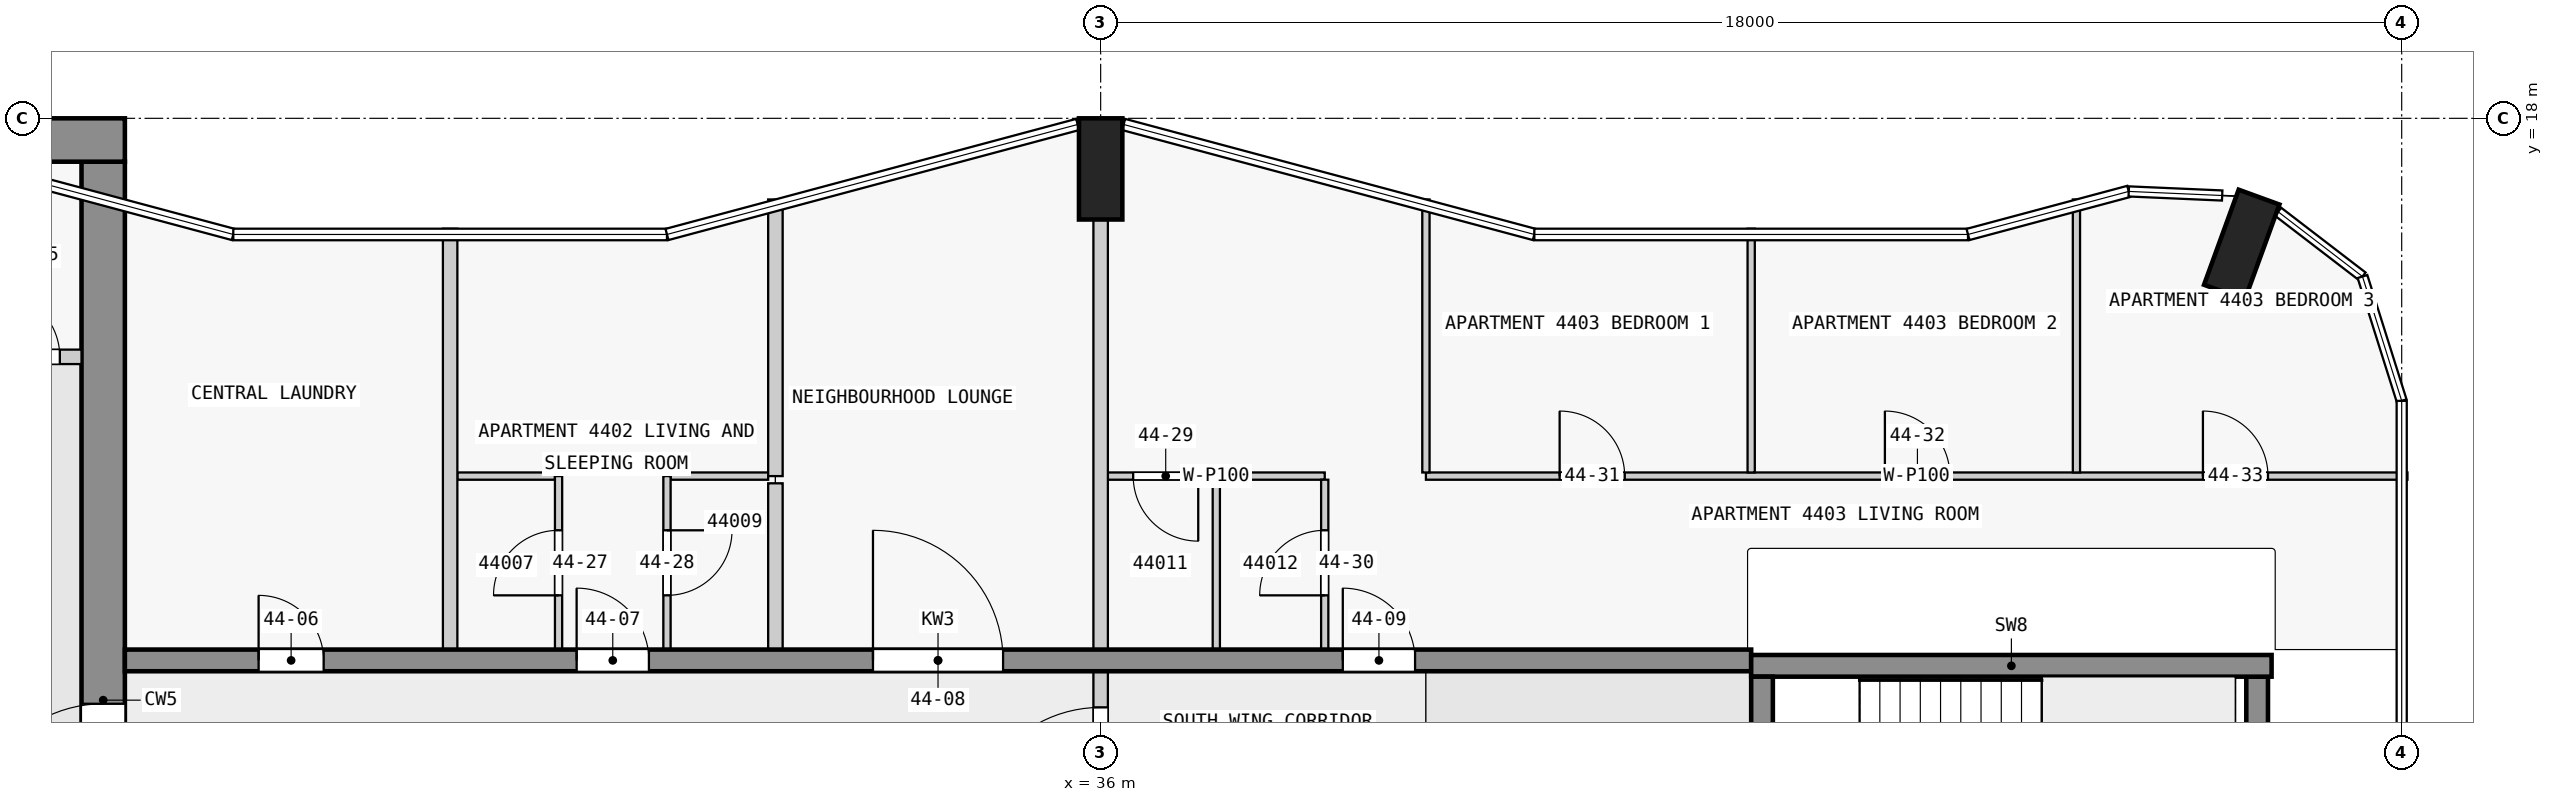
"""IFC4 building model, lengths in metres.
Left out: names, types, materials, properties, quantities, classifications, styles, units other than length and angle.
Written with IfcOpenShell. Run it as: python <this file> out.ifc"""

import sys

from ifc_helpers import new_model, si_unit, direction, frame, frame_2d, origin, origin_2d, place, context, subcontext, project, spatial, rectangle, extrude, element, fill, save


model = new_model("IFC4")
c1 = context("Model", 3, precision=1e-05, world=origin(), true_north=direction((0.0, 1.0)))
c2 = subcontext(c1, "Body", "Model", "MODEL_VIEW")
j1 = project(units=[si_unit("LENGTHUNIT", "METRE"), si_unit("PLANEANGLEUNIT", "RADIAN")], contexts=[c1])
p1 = place(None, origin())
s1 = spatial("IfcSite", under=j1, at=p1, CompositionType="ELEMENT")
p2 = place(p1, origin())
s2 = spatial("IfcBuilding", under=s1, at=p2, CompositionType="ELEMENT")
p3 = place(p2, frame((0.0, 0.0, 170.9)))
s3 = spatial("IfcBuildingStorey", under=s2, at=p3, CompositionType="ELEMENT", Elevation=170.9)
for number, where, z_axis, x_axis in (
    (1, (51.787, 16.252, 0.0), (0.0, 0.0, 1.0), (-0.94, 0.342, 0.0)),
    (2, (36.0, 17.3, 0.0), (0.0, 0.0, 1.0), (1.0, 0.0, 0.0)),
):
    element("IfcColumn", number, at=place(p3, frame(where, z_axis=z_axis, x_axis=x_axis)), inside=s3, PredefinedType="COLUMN", context=c2, shape_type="SweptSolid", body=[
        extrude(rectangle(XDim=0.6, YDim=1.4, at=origin_2d()), origin(), (0.0, 0.0, 1.0), 3.5),
    ])
p4 = place(p3, frame((1.38, 17.7, 0.0), z_axis=(0.0, 0.0, 1.0), x_axis=(1.0, 0.0, 0.0)))
e3 = element("IfcWall", 3, at=p4, inside=s3, PredefinedType="SHEAR", context=c2, shape_type="SweptSolid", body=[
    extrude(rectangle(XDim=21.12, YDim=0.6, at=frame_2d((10.56, 0.0))), origin(), (0.0, 0.0, 1.0), 3.25),
])
p5 = place(p4, frame((6.4, 0.0, 0.0)))
e4 = element("IfcOpeningElement", 4, at=p5, cuts=e3, PredefinedType="OPENING", context=c2, shape_type="SweptSolid", body=[
    extrude(rectangle(XDim=1.8, YDim=2.1, at=frame_2d((0.9, 1.05))), frame((0.0, 0.31, 0.0), z_axis=(0.0, -1.0, 0.0), x_axis=(1.0, 0.0, 0.0)), (0.0, 0.0, 1.0), 0.62),
])
p6 = place(p3, frame((22.2, 2.5, 0.0), z_axis=(0.0, 0.0, 1.0), x_axis=(0.0, 1.0, 0.0)))
e5 = element("IfcWall", 5, at=p6, inside=s3, PredefinedType="SHEAR", context=c2, shape_type="SweptSolid", body=[
    extrude(rectangle(XDim=14.9, YDim=0.6, at=frame_2d((7.45, 0.0))), origin(), (0.0, 0.0, 1.0), 3.25),
])
p7 = place(p6, frame((5.6, 0.0, 0.0)))
e6 = element("IfcOpeningElement", 6, at=p7, cuts=e5, PredefinedType="OPENING", context=c2, shape_type="SweptSolid", body=[
    extrude(rectangle(XDim=1.8, YDim=2.1, at=frame_2d((0.9, 1.05))), frame((0.0, 0.31, 0.0), z_axis=(0.0, -1.0, 0.0), x_axis=(1.0, 0.0, 0.0)), (0.0, 0.0, 1.0), 0.62),
])
p8 = place(p3, frame((45.15, 7.725, 0.0), z_axis=(0.0, 0.0, 1.0), x_axis=(0.0, 1.0, 0.0)))
e7 = element("IfcWall", 7, at=p8, inside=s3, PredefinedType="SHEAR", context=c2, shape_type="SweptSolid", body=[
    extrude(rectangle(XDim=2.55, YDim=0.3, at=frame_2d((1.275, 0.0))), origin(), (0.0, 0.0, 1.0), 3.5),
])
p9 = place(p8, frame((0.725, 0.0, 0.0)))
e8 = element("IfcOpeningElement", 8, at=p9, cuts=e7, PredefinedType="OPENING", context=c2, shape_type="SweptSolid", body=[
    extrude(rectangle(XDim=1.1, YDim=2.1, at=frame_2d((0.55, 1.05))), frame((0.0, 0.16, 0.0), z_axis=(0.0, -1.0, 0.0), x_axis=(1.0, 0.0, 0.0)), (0.0, 0.0, 1.0), 0.32),
])
p10 = place(p3, frame((52.0, 7.725, 0.0), z_axis=(0.0, 0.0, 1.0), x_axis=(0.0, 1.0, 0.0)))
e9 = element("IfcWall", 9, at=p10, inside=s3, PredefinedType="SHEAR", context=c2, shape_type="SweptSolid", body=[
    extrude(rectangle(XDim=2.55, YDim=0.3, at=frame_2d((1.275, 0.0))), origin(), (0.0, 0.0, 1.0), 3.5),
])
p11 = place(p3, frame((45.0, 10.425, 0.0), z_axis=(0.0, 0.0, 1.0), x_axis=(1.0, 0.0, 0.0)))
e10 = element("IfcWall", 10, at=p11, inside=s3, PredefinedType="SHEAR", context=c2, shape_type="SweptSolid", body=[
    extrude(rectangle(XDim=7.2, YDim=0.3, at=frame_2d((3.6, 0.0))), origin(), (0.0, 0.0, 1.0), 3.5),
])
p12 = place(p3, frame((22.5, 10.5, 0.0), z_axis=(0.0, 0.0, 1.0), x_axis=(1.0, 0.0, 0.0)))
e11 = element("IfcWall", 11, at=p12, inside=s3, PredefinedType="SHEAR", context=c2, shape_type="SweptSolid", body=[
    extrude(rectangle(XDim=22.5, YDim=0.3, at=frame_2d((11.25, 0.0))), origin(), (0.0, 0.0, 1.0), 3.25),
])
p13 = place(p12, frame((1.85, 0.0, 0.0)))
e12 = element("IfcOpeningElement", 12, at=p13, cuts=e11, PredefinedType="OPENING", context=c2, shape_type="SweptSolid", body=[
    extrude(rectangle(XDim=0.9, YDim=2.1, at=frame_2d((0.45, 1.05))), frame((0.0, 0.16, 0.0), z_axis=(0.0, -1.0, 0.0), x_axis=(1.0, 0.0, 0.0)), (0.0, 0.0, 1.0), 0.32),
])
p14 = place(p12, frame((6.25, 0.0, 0.0)))
e13 = element("IfcOpeningElement", 13, at=p14, cuts=e11, PredefinedType="OPENING", context=c2, shape_type="SweptSolid", body=[
    extrude(rectangle(XDim=1.0, YDim=2.1, at=frame_2d((0.5, 1.05))), frame((0.0, 0.16, 0.0), z_axis=(0.0, -1.0, 0.0), x_axis=(1.0, 0.0, 0.0)), (0.0, 0.0, 1.0), 0.32),
])
p15 = place(p12, frame((10.35, 0.0, 0.0)))
e14 = element("IfcOpeningElement", 14, at=p15, cuts=e11, PredefinedType="OPENING", context=c2, shape_type="SweptSolid", body=[
    extrude(rectangle(XDim=1.8, YDim=2.1, at=frame_2d((0.9, 1.05))), frame((0.0, 0.16, 0.0), z_axis=(0.0, -1.0, 0.0), x_axis=(1.0, 0.0, 0.0)), (0.0, 0.0, 1.0), 0.32),
])
p16 = place(p12, frame((16.85, 0.0, 0.0)))
e15 = element("IfcOpeningElement", 15, at=p16, cuts=e11, PredefinedType="OPENING", context=c2, shape_type="SweptSolid", body=[
    extrude(rectangle(XDim=1.0, YDim=2.1, at=frame_2d((0.5, 1.05))), frame((0.0, 0.16, 0.0), z_axis=(0.0, -1.0, 0.0), x_axis=(1.0, 0.0, 0.0)), (0.0, 0.0, 1.0), 0.32),
])
p17 = place(p3, frame((18.6, 14.7, 0.0), z_axis=(0.0, 0.0, 1.0), x_axis=(1.0, 0.0, 0.0)))
e16 = element("IfcWall", 16, at=p17, inside=s3, PredefinedType="PARTITIONING", context=c2, shape_type="SweptSolid", body=[
    extrude(rectangle(XDim=3.3, YDim=0.2, at=frame_2d((1.65, 0.0))), origin(), (0.0, 0.0, 1.0), 3.25),
])
p18 = place(p17, frame((0.45, 0.0, 0.0)))
e17 = element("IfcOpeningElement", 17, at=p18, cuts=e16, PredefinedType="OPENING", context=c2, shape_type="SweptSolid", body=[
    extrude(rectangle(XDim=0.9, YDim=2.1, at=frame_2d((0.45, 1.05))), frame((0.0, 0.11, 0.0), z_axis=(0.0, -1.0, 0.0), x_axis=(1.0, 0.0, 0.0)), (0.0, 0.0, 1.0), 0.22),
])
p19 = place(p17, frame((2.1, 0.0, 0.0)))
e18 = element("IfcOpeningElement", 18, at=p19, cuts=e16, PredefinedType="OPENING", context=c2, shape_type="SweptSolid", body=[
    extrude(rectangle(XDim=0.9, YDim=2.1, at=frame_2d((0.45, 1.05))), frame((0.0, 0.11, 0.0), z_axis=(0.0, -1.0, 0.0), x_axis=(1.0, 0.0, 0.0)), (0.0, 0.0, 1.0), 0.22),
])
for number, where, z_axis, x_axis in (
    (19, (28.45, 13.05, 0.0), (0.0, 0.0, 1.0), (-1.0, 0.0, 0.0)),
    (20, (31.4, 13.05, 0.0), (0.0, 0.0, 1.0), (-1.0, 0.0, 0.0)),
):
    element("IfcWall", number, at=place(p3, frame(where, z_axis=z_axis, x_axis=x_axis)), inside=s3, PredefinedType="PARTITIONING", context=c2, shape_type="SweptSolid", body=[
        extrude(rectangle(XDim=1.35, YDim=0.1, at=frame_2d((0.675, 0.0))), origin(), (0.0, 0.0, 1.0), 3.25),
    ])
p20 = place(p3, frame((39.1, 13.05, 0.0), z_axis=(0.0, 0.0, 1.0), x_axis=(-1.0, 0.0, 0.0)))
e21 = element("IfcWall", 21, at=p20, inside=s3, PredefinedType="PARTITIONING", context=c2, shape_type="SweptSolid", body=[
    extrude(rectangle(XDim=3.0, YDim=0.1, at=frame_2d((1.5, 0.0))), origin(), (0.0, 0.0, 1.0), 3.25),
])
p21 = place(p20, frame((1.75, 0.0, 0.0)))
e22 = element("IfcOpeningElement", 22, at=p21, cuts=e21, PredefinedType="OPENING", context=c2, shape_type="SweptSolid", body=[
    extrude(rectangle(XDim=0.9, YDim=2.1, at=frame_2d((0.45, 1.05))), frame((0.0, 0.06, 0.0), z_axis=(0.0, -1.0, 0.0), x_axis=(1.0, 0.0, 0.0)), (0.0, 0.0, 1.0), 0.12),
])
p22 = place(p3, frame((40.5, 13.05, 0.0), z_axis=(0.0, 0.0, 1.0), x_axis=(1.0, 0.0, 0.0)))
e23 = element("IfcWall", 23, at=p22, inside=s3, PredefinedType="PARTITIONING", context=c2, shape_type="SweptSolid", body=[
    extrude(rectangle(XDim=13.58, YDim=0.1, at=frame_2d((6.79, 0.0))), origin(), (0.0, 0.0, 1.0), 3.25),
])
p23 = place(p22, frame((1.85, 0.0, 0.0)))
e24 = element("IfcOpeningElement", 24, at=p23, cuts=e23, PredefinedType="OPENING", context=c2, shape_type="SweptSolid", body=[
    extrude(rectangle(XDim=0.9, YDim=2.1, at=frame_2d((0.45, 1.05))), frame((0.0, 0.06, 0.0), z_axis=(0.0, -1.0, 0.0), x_axis=(1.0, 0.0, 0.0)), (0.0, 0.0, 1.0), 0.12),
])
p24 = place(p22, frame((6.35, 0.0, 0.0)))
e25 = element("IfcOpeningElement", 25, at=p24, cuts=e23, PredefinedType="OPENING", context=c2, shape_type="SweptSolid", body=[
    extrude(rectangle(XDim=0.9, YDim=2.1, at=frame_2d((0.45, 1.05))), frame((0.0, 0.06, 0.0), z_axis=(0.0, -1.0, 0.0), x_axis=(1.0, 0.0, 0.0)), (0.0, 0.0, 1.0), 0.12),
])
p25 = place(p22, frame((10.75, 0.0, 0.0)))
e26 = element("IfcOpeningElement", 26, at=p25, cuts=e23, PredefinedType="OPENING", context=c2, shape_type="SweptSolid", body=[
    extrude(rectangle(XDim=0.9, YDim=2.1, at=frame_2d((0.45, 1.05))), frame((0.0, 0.06, 0.0), z_axis=(0.0, -1.0, 0.0), x_axis=(1.0, 0.0, 0.0)), (0.0, 0.0, 1.0), 0.12),
])
p26 = place(p3, frame((27.0, 10.65, 0.0), z_axis=(0.0, 0.0, 1.0), x_axis=(0.0, 1.0, 0.0)))
e27 = element("IfcWall", 27, at=p26, inside=s3, PredefinedType="PARTITIONING", context=c2, shape_type="SweptSolid", body=[
    extrude(rectangle(XDim=5.823, YDim=0.2, at=frame_2d((2.912, 0.0))), origin(), (0.0, 0.0, 1.0), 3.25),
])
p27 = place(p3, frame((28.5, 10.65, 0.0), z_axis=(0.0, 0.0, 1.0), x_axis=(0.0, 1.0, 0.0)))
e28 = element("IfcWall", 28, at=p27, inside=s3, PredefinedType="PARTITIONING", context=c2, shape_type="SweptSolid", body=[
    extrude(rectangle(XDim=2.4, YDim=0.1, at=frame_2d((1.2, 0.0))), origin(), (0.0, 0.0, 1.0), 3.25),
])
p28 = place(p27, frame((0.75, 0.0, 0.0)))
e29 = element("IfcOpeningElement", 29, at=p28, cuts=e28, PredefinedType="OPENING", context=c2, shape_type="SweptSolid", body=[
    extrude(rectangle(XDim=0.9, YDim=2.1, at=frame_2d((0.45, 1.05))), frame((0.0, 0.06, 0.0), z_axis=(0.0, -1.0, 0.0), x_axis=(1.0, 0.0, 0.0)), (0.0, 0.0, 1.0), 0.12),
])
p29 = place(p3, frame((30.0, 13.05, 0.0), z_axis=(0.0, 0.0, 1.0), x_axis=(0.0, -1.0, 0.0)))
e30 = element("IfcWall", 30, at=p29, inside=s3, PredefinedType="PARTITIONING", context=c2, shape_type="SweptSolid", body=[
    extrude(rectangle(XDim=2.4, YDim=0.1, at=frame_2d((1.2, 0.0))), origin(), (0.0, 0.0, 1.0), 3.25),
])
p30 = place(p29, frame((0.75, 0.0, 0.0)))
e31 = element("IfcOpeningElement", 31, at=p30, cuts=e30, PredefinedType="OPENING", context=c2, shape_type="SweptSolid", body=[
    extrude(rectangle(XDim=0.9, YDim=2.1, at=frame_2d((0.45, 1.05))), frame((0.0, 0.06, 0.0), z_axis=(0.0, -1.0, 0.0), x_axis=(1.0, 0.0, 0.0)), (0.0, 0.0, 1.0), 0.12),
])
p31 = place(p3, frame((31.5, 16.878, 0.0), z_axis=(0.0, 0.0, 1.0), x_axis=(0.0, -1.0, 0.0)))
e32 = element("IfcWall", 32, at=p31, inside=s3, PredefinedType="PARTITIONING", context=c2, shape_type="SweptSolid", body=[
    extrude(rectangle(XDim=3.828, YDim=0.2, at=frame_2d((1.914, 0.0))), origin(), (0.0, 0.0, 1.0), 3.25),
])
p32 = place(p3, frame((31.5, 10.65, 0.0), z_axis=(0.0, 0.0, 1.0), x_axis=(0.0, 1.0, 0.0)))
e33 = element("IfcWall", 33, at=p32, inside=s3, PredefinedType="PARTITIONING", context=c2, shape_type="SweptSolid", body=[
    extrude(rectangle(XDim=2.3, YDim=0.2, at=frame_2d((1.15, 0.0))), origin(), (0.0, 0.0, 1.0), 3.25),
])
p33 = place(p3, frame((36.0, 10.65, 0.0), z_axis=(0.0, 0.0, 1.0), x_axis=(0.0, 1.0, 0.0)))
e34 = element("IfcWall", 34, at=p33, inside=s3, PredefinedType="PARTITIONING", context=c2, shape_type="SweptSolid", body=[
    extrude(rectangle(XDim=5.95, YDim=0.2, at=frame_2d((2.975, 0.0))), origin(), (0.0, 0.0, 1.0), 3.25),
])
p34 = place(p3, frame((37.6, 10.65, 0.0), z_axis=(0.0, 0.0, 1.0), x_axis=(0.0, 1.0, 0.0)))
e35 = element("IfcWall", 35, at=p34, inside=s3, PredefinedType="PARTITIONING", context=c2, shape_type="SweptSolid", body=[
    extrude(rectangle(XDim=2.35, YDim=0.1, at=frame_2d((1.175, 0.0))), origin(), (0.0, 0.0, 1.0), 3.25),
])
p35 = place(p3, frame((39.1, 10.65, 0.0), z_axis=(0.0, 0.0, 1.0), x_axis=(0.0, 1.0, 0.0)))
e36 = element("IfcWall", 36, at=p35, inside=s3, PredefinedType="PARTITIONING", context=c2, shape_type="SweptSolid", body=[
    extrude(rectangle(XDim=2.35, YDim=0.1, at=frame_2d((1.175, 0.0))), origin(), (0.0, 0.0, 1.0), 3.25),
])
p36 = place(p35, frame((0.75, 0.0, 0.0)))
e37 = element("IfcOpeningElement", 37, at=p36, cuts=e36, PredefinedType="OPENING", context=c2, shape_type="SweptSolid", body=[
    extrude(rectangle(XDim=0.9, YDim=2.1, at=frame_2d((0.45, 1.05))), frame((0.0, 0.06, 0.0), z_axis=(0.0, -1.0, 0.0), x_axis=(1.0, 0.0, 0.0)), (0.0, 0.0, 1.0), 0.12),
])
p37 = place(p3, frame((40.5, 16.878, 0.0), z_axis=(0.0, 0.0, 1.0), x_axis=(0.0, -1.0, 0.0)))
e38 = element("IfcWall", 38, at=p37, inside=s3, PredefinedType="PARTITIONING", context=c2, shape_type="SweptSolid", body=[
    extrude(rectangle(XDim=3.778, YDim=0.1, at=frame_2d((1.889, 0.0))), origin(), (0.0, 0.0, 1.0), 3.25),
])
p38 = place(p3, frame((45.0, 13.1, 0.0), z_axis=(0.0, 0.0, 1.0), x_axis=(0.0, 1.0, 0.0)))
e39 = element("IfcWall", 39, at=p38, inside=s3, PredefinedType="PARTITIONING", context=c2, shape_type="SweptSolid", body=[
    extrude(rectangle(XDim=3.373, YDim=0.1, at=frame_2d((1.687, 0.0))), origin(), (0.0, 0.0, 1.0), 3.25),
])
p39 = place(p3, frame((49.5, 13.1, 0.0), z_axis=(0.0, 0.0, 1.0), x_axis=(0.0, 1.0, 0.0)))
e40 = element("IfcWall", 40, at=p39, inside=s3, PredefinedType="PARTITIONING", context=c2, shape_type="SweptSolid", body=[
    extrude(rectangle(XDim=3.778, YDim=0.1, at=frame_2d((1.889, 0.0))), origin(), (0.0, 0.0, 1.0), 3.25),
])
p40 = place(p3, frame((36.0, 7.35, 0.0), z_axis=(0.0, 0.0, 1.0), x_axis=(0.0, 1.0, 0.0)))
e41 = element("IfcWall", 41, at=p40, inside=s3, PredefinedType="PARTITIONING", context=c2, shape_type="SweptSolid", body=[
    extrude(rectangle(XDim=3.2, YDim=0.2, at=frame_2d((1.6, 0.0))), origin(), (0.0, 0.0, 1.0), 3.25),
])
p41 = place(p40, frame((0.7, 0.0, 0.0)))
e42 = element("IfcOpeningElement", 42, at=p41, cuts=e41, PredefinedType="OPENING", context=c2, shape_type="SweptSolid", body=[
    extrude(rectangle(XDim=1.8, YDim=2.1, at=frame_2d((0.9, 1.05))), frame((0.0, 0.11, 0.0), z_axis=(0.0, -1.0, 0.0), x_axis=(1.0, 0.0, 0.0)), (0.0, 0.0, 1.0), 0.22),
])
p42 = place(p7, origin())
e43 = element("IfcDoor", 43, at=p42, inside=s3, OperationType="DOUBLE_DOOR_SINGLE_SWING", PredefinedType="DOOR", context=c2, shape_type="SweptSolid", body=[
    extrude(rectangle(XDim=1.8, YDim=2.1, at=frame_2d((0.9, 1.05))), frame((0.0, 0.025, 0.0), z_axis=(0.0, -1.0, 0.0), x_axis=(1.0, 0.0, 0.0)), (0.0, 0.0, 1.0), 0.05),
])
fill(e6, e43)
p43 = place(p19, origin())
e44 = element("IfcDoor", 44, at=p43, inside=s3, OperationType="SINGLE_SWING_LEFT", PredefinedType="DOOR", context=c2, shape_type="SweptSolid", body=[
    extrude(rectangle(XDim=0.9, YDim=2.1, at=frame_2d((0.45, 1.05))), frame((0.0, 0.025, 0.0), z_axis=(0.0, -1.0, 0.0), x_axis=(1.0, 0.0, 0.0)), (0.0, 0.0, 1.0), 0.05),
])
fill(e18, e44)
p44 = place(p13, origin())
e45 = element("IfcDoor", 45, at=p44, inside=s3, OperationType="SINGLE_SWING_LEFT", PredefinedType="DOOR", context=c2, shape_type="SweptSolid", body=[
    extrude(rectangle(XDim=0.9, YDim=2.1, at=frame_2d((0.45, 1.05))), frame((0.0, 0.025, 0.0), z_axis=(0.0, -1.0, 0.0), x_axis=(1.0, 0.0, 0.0)), (0.0, 0.0, 1.0), 0.05),
])
fill(e12, e45)
p45 = place(p14, origin())
e46 = element("IfcDoor", 46, at=p45, inside=s3, OperationType="SINGLE_SWING_LEFT", PredefinedType="DOOR", context=c2, shape_type="SweptSolid", body=[
    extrude(rectangle(XDim=1.0, YDim=2.1, at=frame_2d((0.5, 1.05))), frame((0.0, 0.025, 0.0), z_axis=(0.0, -1.0, 0.0), x_axis=(1.0, 0.0, 0.0)), (0.0, 0.0, 1.0), 0.05),
])
fill(e13, e46)
p46 = place(p15, origin())
e47 = element("IfcDoor", 47, at=p46, inside=s3, OperationType="SINGLE_SWING_LEFT", PredefinedType="DOOR", context=c2, shape_type="SweptSolid", body=[
    extrude(rectangle(XDim=1.8, YDim=2.1, at=frame_2d((0.9, 1.05))), frame((0.0, 0.025, 0.0), z_axis=(0.0, -1.0, 0.0), x_axis=(1.0, 0.0, 0.0)), (0.0, 0.0, 1.0), 0.05),
])
fill(e14, e47)
p47 = place(p16, origin())
e48 = element("IfcDoor", 48, at=p47, inside=s3, OperationType="SINGLE_SWING_RIGHT", PredefinedType="DOOR", context=c2, shape_type="SweptSolid", body=[
    extrude(rectangle(XDim=1.0, YDim=2.1, at=frame_2d((0.5, 1.05))), frame((0.0, 0.025, 0.0), z_axis=(0.0, -1.0, 0.0), x_axis=(1.0, 0.0, 0.0)), (0.0, 0.0, 1.0), 0.05),
])
fill(e15, e48)
p48 = place(p41, origin())
e49 = element("IfcDoor", 49, at=p48, inside=s3, OperationType="SINGLE_SWING_LEFT", PredefinedType="DOOR", context=c2, shape_type="SweptSolid", body=[
    extrude(rectangle(XDim=1.8, YDim=2.1, at=frame_2d((0.9, 1.05))), frame((0.0, 0.025, 0.0), z_axis=(0.0, -1.0, 0.0), x_axis=(1.0, 0.0, 0.0)), (0.0, 0.0, 1.0), 0.05),
])
fill(e42, e49)
p49 = place(p28, origin())
e50 = element("IfcDoor", 50, at=p49, inside=s3, OperationType="SINGLE_SWING_LEFT", PredefinedType="DOOR", context=c2, shape_type="SweptSolid", body=[
    extrude(rectangle(XDim=0.9, YDim=2.1, at=frame_2d((0.45, 1.05))), frame((0.0, 0.025, 0.0), z_axis=(0.0, -1.0, 0.0), x_axis=(1.0, 0.0, 0.0)), (0.0, 0.0, 1.0), 0.05),
])
fill(e29, e50)
p50 = place(p30, origin())
e51 = element("IfcDoor", 51, at=p50, inside=s3, OperationType="SINGLE_SWING_LEFT", PredefinedType="DOOR", context=c2, shape_type="SweptSolid", body=[
    extrude(rectangle(XDim=0.9, YDim=2.1, at=frame_2d((0.45, 1.05))), frame((0.0, 0.025, 0.0), z_axis=(0.0, -1.0, 0.0), x_axis=(1.0, 0.0, 0.0)), (0.0, 0.0, 1.0), 0.05),
])
fill(e31, e51)
p51 = place(p21, origin())
e52 = element("IfcDoor", 52, at=p51, inside=s3, OperationType="SINGLE_SWING_RIGHT", PredefinedType="DOOR", context=c2, shape_type="SweptSolid", body=[
    extrude(rectangle(XDim=0.9, YDim=2.1, at=frame_2d((0.45, 1.05))), frame((0.0, 0.025, 0.0), z_axis=(0.0, -1.0, 0.0), x_axis=(1.0, 0.0, 0.0)), (0.0, 0.0, 1.0), 0.05),
])
fill(e22, e52)
p52 = place(p36, origin())
e53 = element("IfcDoor", 53, at=p52, inside=s3, OperationType="SINGLE_SWING_RIGHT", PredefinedType="DOOR", context=c2, shape_type="SweptSolid", body=[
    extrude(rectangle(XDim=0.9, YDim=2.1, at=frame_2d((0.45, 1.05))), frame((0.0, 0.025, 0.0), z_axis=(0.0, -1.0, 0.0), x_axis=(1.0, 0.0, 0.0)), (0.0, 0.0, 1.0), 0.05),
])
fill(e37, e53)
p53 = place(p23, origin())
e54 = element("IfcDoor", 54, at=p53, inside=s3, OperationType="SINGLE_SWING_LEFT", PredefinedType="DOOR", context=c2, shape_type="SweptSolid", body=[
    extrude(rectangle(XDim=0.9, YDim=2.1, at=frame_2d((0.45, 1.05))), frame((0.0, 0.025, 0.0), z_axis=(0.0, -1.0, 0.0), x_axis=(1.0, 0.0, 0.0)), (0.0, 0.0, 1.0), 0.05),
])
fill(e24, e54)
p54 = place(p24, origin())
e55 = element("IfcDoor", 55, at=p54, inside=s3, OperationType="SINGLE_SWING_RIGHT", PredefinedType="DOOR", context=c2, shape_type="SweptSolid", body=[
    extrude(rectangle(XDim=0.9, YDim=2.1, at=frame_2d((0.45, 1.05))), frame((0.0, 0.025, 0.0), z_axis=(0.0, -1.0, 0.0), x_axis=(1.0, 0.0, 0.0)), (0.0, 0.0, 1.0), 0.05),
])
fill(e25, e55)
p55 = place(p25, origin())
e56 = element("IfcDoor", 56, at=p55, inside=s3, OperationType="SINGLE_SWING_RIGHT", PredefinedType="DOOR", context=c2, shape_type="SweptSolid", body=[
    extrude(rectangle(XDim=0.9, YDim=2.1, at=frame_2d((0.45, 1.05))), frame((0.0, 0.025, 0.0), z_axis=(0.0, -1.0, 0.0), x_axis=(1.0, 0.0, 0.0)), (0.0, 0.0, 1.0), 0.05),
])
fill(e26, e56)
save(model, sys.argv[1])
